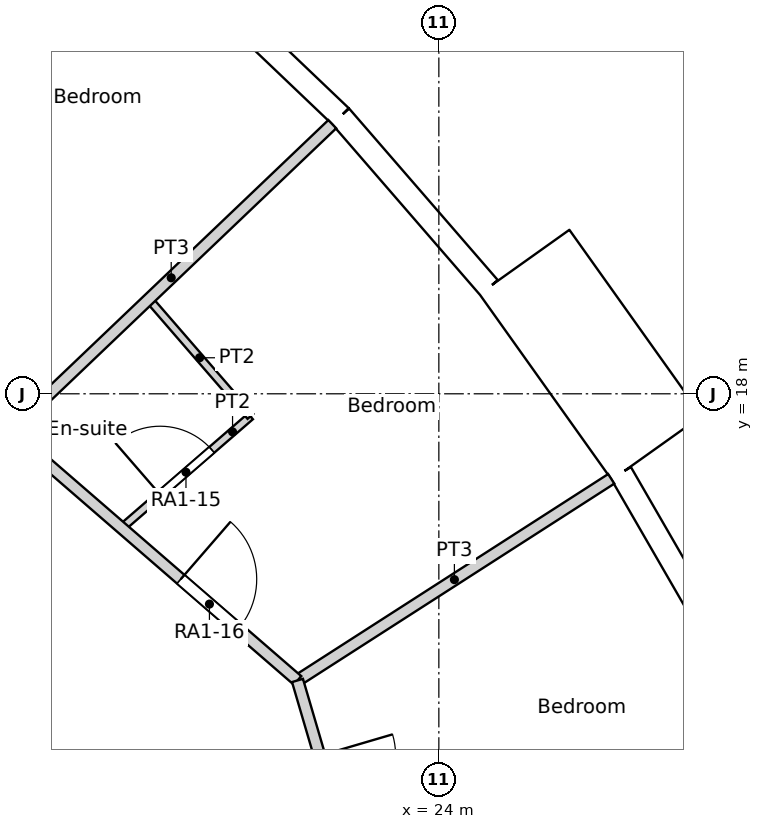
"""IFC4 building model, lengths in metres.
Left out: names, types, materials, properties, quantities, classifications, styles, units other than length and angle.
Written with IfcOpenShell. Run it as: python <this file> out.ifc"""

import sys

from ifc_helpers import new_model, si_unit, direction, frame, frame_2d, origin, origin_2d, place, context, subcontext, project, spatial, rectangle, circle, extrude, element, fill, save


model = new_model("IFC4")
c1 = context("Model", 3, precision=1e-05, world=origin(), true_north=direction((0.0, 1.0)))
c2 = subcontext(c1, "Body", "Model", "MODEL_VIEW")
j1 = project(units=[si_unit("LENGTHUNIT", "METRE"), si_unit("PLANEANGLEUNIT", "RADIAN")], contexts=[c1])
p1 = place(None, origin())
s1 = spatial("IfcSite", under=j1, at=p1, CompositionType="ELEMENT")
p2 = place(p1, origin())
s2 = spatial("IfcBuilding", under=s1, at=p2, CompositionType="ELEMENT")
p3 = place(p2, frame((0.0, 0.0, 28.2)))
s3 = spatial("IfcBuildingStorey", under=s2, at=p3, CompositionType="ELEMENT", Elevation=28.2)
for number, where, z_axis, x_axis in (
    (1, (25.469, 16.368, 0.0), (0.0, 0.0, 1.0), (1.0, 0.0, 0.0)),
    (2, (21.911, 20.892, 0.0), (0.0, 0.0, 1.0), (1.0, 0.0, 0.0)),
):
    element("IfcColumn", number, at=place(p3, frame(where, z_axis=z_axis, x_axis=x_axis)), inside=s3, PredefinedType="COLUMN", context=c2, shape_type="SweptSolid", body=[
        extrude(circle(Radius=0.7, at=origin_2d()), origin(), (0.0, 0.0, 1.0), 3.6),
    ])
p4 = place(p3, frame((18.805, 15.779, 0.0), z_axis=(0.0, 0.0, 1.0), x_axis=(1.0, 0.0, 0.0)))
e3 = element("IfcColumn", 3, at=p4, inside=s3, PredefinedType="COLUMN", context=c2, shape_type="SweptSolid", body=[
    extrude(circle(Radius=0.75, at=origin_2d()), origin(), (0.0, 0.0, 1.0), 3.6),
])
p5 = place(p3, frame((27.887, 14.377, 0.0), z_axis=(0.0, 0.0, 1.0), x_axis=(-0.499999078476, 0.866025935826, 0.0)))
e4 = element("IfcWall", 4, at=p5, inside=s3, PredefinedType="SOLIDWALL", context=c2, shape_type="SweptSolid", body=[
    extrude(rectangle(XDim=2.979, YDim=0.3, at=frame_2d((1.49, 0.0))), origin(), (0.0, 0.0, 1.0), 3.15),
])
p6 = place(p5, frame((1.49, 0.0, 1.55)))
e5 = element("IfcOpeningElement", 5, at=p6, cuts=e4, PredefinedType="OPENING", context=c2, shape_type="SweptSolid", body=[
    extrude(circle(Radius=0.9, at=origin_2d()), frame((0.0, 0.16, 0.0), z_axis=(0.0, -1.0, 0.0), x_axis=(1.0, 0.0, 0.0)), (0.0, 0.0, 1.0), 0.32),
])
p7 = place(p3, frame((26.866, 17.29, -0.45), z_axis=(0.0, 0.0, 1.0), x_axis=(-0.580090570606, 0.814551981088, 0.0)))
e6 = element("IfcWall", 6, at=p7, inside=s3, PredefinedType="ELEMENTEDWALL", context=c2, shape_type="SweptSolid", body=[
    extrude(rectangle(XDim=3.0, YDim=1.45, at=frame_2d((1.5, 0.0))), origin(), (0.0, 0.0, 1.0), 3.6),
])
p8 = place(p7, frame((1.5, 0.0, 2.0)))
e7 = element("IfcOpeningElement", 7, at=p8, cuts=e6, PredefinedType="OPENING", context=c2, shape_type="SweptSolid", body=[
    extrude(circle(Radius=0.9, at=origin_2d()), frame((0.0, 0.735, 0.0), z_axis=(0.0, -1.0, 0.0), x_axis=(1.0, 0.0, 0.0)), (0.0, 0.0, 1.0), 1.47),
])
p9 = place(p3, frame((24.658, 19.399, 0.0), z_axis=(0.0, 0.0, 1.0), x_axis=(-0.654830712471, 0.755775587066, 0.0)))
e8 = element("IfcWall", 8, at=p9, inside=s3, PredefinedType="SOLIDWALL", context=c2, shape_type="SweptSolid", body=[
    extrude(rectangle(XDim=2.98, YDim=0.3, at=frame_2d((1.49, 0.0))), origin(), (0.0, 0.0, 1.0), 3.15),
])
p10 = place(p9, frame((1.49, 0.0, 1.55)))
e9 = element("IfcOpeningElement", 9, at=p10, cuts=e8, PredefinedType="OPENING", context=c2, shape_type="SweptSolid", body=[
    extrude(circle(Radius=0.9, at=origin_2d()), frame((0.0, 0.16, 0.0), z_axis=(0.0, -1.0, 0.0), x_axis=(1.0, 0.0, 0.0)), (0.0, 0.0, 1.0), 0.32),
])
p11 = place(p3, frame((22.707, 21.651, 0.0), z_axis=(0.0, 0.0, 1.0), x_axis=(-0.723744206617, 0.690068346896, 0.0)))
e10 = element("IfcWall", 10, at=p11, inside=s3, PredefinedType="SOLIDWALL", context=c2, shape_type="SweptSolid", body=[
    extrude(rectangle(XDim=2.98, YDim=0.3, at=frame_2d((1.49, 0.0))), origin(), (0.0, 0.0, 1.0), 3.15),
])
p12 = place(p11, frame((1.49, 0.0, 1.55)))
e11 = element("IfcOpeningElement", 11, at=p12, cuts=e10, PredefinedType="OPENING", context=c2, shape_type="SweptSolid", body=[
    extrude(circle(Radius=0.9, at=origin_2d()), frame((0.0, 0.16, 0.0), z_axis=(0.0, -1.0, 0.0), x_axis=(1.0, 0.0, 0.0)), (0.0, 0.0, 1.0), 0.32),
])
p13 = place(p3, frame((22.14, 14.229, 0.0), z_axis=(0.0, 0.0, 1.0), x_axis=(0.281780364869, -0.959478934617, 0.0)))
e12 = element("IfcWall", 12, at=p13, inside=s3, PredefinedType="PARTITIONING", context=c2, shape_type="SweptSolid", body=[
    extrude(rectangle(XDim=14.83, YDim=0.15, at=frame_2d((7.415, 0.0))), origin(), (0.0, 0.0, 1.0), 3.15),
])
p14 = place(p13, frame((10.816, 0.0, 0.0)))
e13 = element("IfcOpeningElement", 13, at=p14, cuts=e12, PredefinedType="OPENING", context=c2, shape_type="SweptSolid", body=[
    extrude(rectangle(XDim=1.0, YDim=2.1, at=frame_2d((0.5, 1.05))), frame((0.0, 0.075, 0.0), z_axis=(0.0, -1.0, 0.0), x_axis=(1.0, 0.0, 0.0)), (0.0, 0.0, 1.0), 0.15),
])
p15 = place(p13, frame((5.953, 0.0, 0.0)))
e14 = element("IfcOpeningElement", 14, at=p15, cuts=e12, PredefinedType="OPENING", context=c2, shape_type="SweptSolid", body=[
    extrude(rectangle(XDim=1.0, YDim=2.1, at=frame_2d((0.5, 1.05))), frame((0.0, 0.075, 0.0), z_axis=(0.0, -1.0, 0.0), x_axis=(1.0, 0.0, 0.0)), (0.0, 0.0, 1.0), 0.15),
])
p16 = place(p13, frame((1.033, 0.0, 0.0)))
e15 = element("IfcOpeningElement", 15, at=p16, cuts=e12, PredefinedType="OPENING", context=c2, shape_type="SweptSolid", body=[
    extrude(rectangle(XDim=1.0, YDim=2.1, at=frame_2d((0.5, 1.05))), frame((0.0, 0.075, 0.0), z_axis=(0.0, -1.0, 0.0), x_axis=(1.0, 0.0, 0.0)), (0.0, 0.0, 1.0), 0.15),
])
p17 = place(p3, frame((10.932, 23.939, 0.0), z_axis=(0.0, 0.0, 1.0), x_axis=(0.755838982892, -0.654757536757, 0.0)))
e16 = element("IfcWall", 16, at=p17, inside=s3, PredefinedType="PARTITIONING", context=c2, shape_type="SweptSolid", body=[
    extrude(rectangle(XDim=14.83, YDim=0.15, at=frame_2d((7.415, 0.0))), origin(), (0.0, 0.0, 1.0), 3.15),
])
p18 = place(p17, frame((12.796, 0.0, 0.0)))
e17 = element("IfcOpeningElement", 17, at=p18, cuts=e16, PredefinedType="OPENING", context=c2, shape_type="SweptSolid", body=[
    extrude(rectangle(XDim=1.0, YDim=2.1, at=frame_2d((0.5, 1.05))), frame((0.0, 0.075, 0.0), z_axis=(0.0, -1.0, 0.0), x_axis=(1.0, 0.0, 0.0)), (0.0, 0.0, 1.0), 0.15),
])
p19 = place(p17, frame((7.572, 0.0, 0.0)))
e18 = element("IfcOpeningElement", 18, at=p19, cuts=e16, PredefinedType="OPENING", context=c2, shape_type="SweptSolid", body=[
    extrude(rectangle(XDim=1.0, YDim=2.1, at=frame_2d((0.5, 1.05))), frame((0.0, 0.075, 0.0), z_axis=(0.0, -1.0, 0.0), x_axis=(1.0, 0.0, 0.0)), (0.0, 0.0, 1.0), 0.15),
])
p20 = place(p17, frame((1.033, 0.0, 0.0)))
e19 = element("IfcOpeningElement", 19, at=p20, cuts=e16, PredefinedType="OPENING", context=c2, shape_type="SweptSolid", body=[
    extrude(rectangle(XDim=1.0, YDim=2.1, at=frame_2d((0.5, 1.05))), frame((0.0, 0.075, 0.0), z_axis=(0.0, -1.0, 0.0), x_axis=(1.0, 0.0, 0.0)), (0.0, 0.0, 1.0), 0.15),
])
p21 = place(p3, frame((22.141, 14.229, 0.0), z_axis=(0.0, 0.0, 1.0), x_axis=(0.841265781699, 0.540621757371, 0.0)))
e20 = element("IfcWall", 20, at=p21, inside=s3, PredefinedType="PARTITIONING", context=c2, shape_type="SweptSolid", body=[
    extrude(rectangle(XDim=4.906, YDim=0.15, at=frame_2d((2.453, 0.0))), origin(), (0.0, 0.0, 1.0), 3.15),
])
p22 = place(p3, frame((19.826, 16.234, 0.0), z_axis=(0.0, 0.0, 1.0), x_axis=(0.755703447798, 0.654913963042, 0.0)))
e21 = element("IfcWall", 21, at=p22, inside=s3, PredefinedType="PARTITIONING", context=c2, shape_type="SweptSolid", body=[
    extrude(rectangle(XDim=2.243, YDim=0.1, at=frame_2d((1.122, 0.0))), origin(), (0.0, 0.0, 1.0), 3.15),
])
p23 = place(p22, frame((0.671, 0.0, 0.0)))
e22 = element("IfcOpeningElement", 22, at=p23, cuts=e21, PredefinedType="OPENING", context=c2, shape_type="SweptSolid", body=[
    extrude(rectangle(XDim=0.9, YDim=2.04, at=frame_2d((0.45, 1.02))), frame((0.0, 0.05, 0.0), z_axis=(0.0, -1.0, 0.0), x_axis=(1.0, 0.0, 0.0)), (0.0, 0.0, 1.0), 0.1),
])
p24 = place(p3, frame((20.184, 19.245, 0.0), z_axis=(0.0, 0.0, 1.0), x_axis=(0.655017058368, -0.755614090159, 0.0)))
e23 = element("IfcWall", 23, at=p24, inside=s3, PredefinedType="PARTITIONING", context=c2, shape_type="SweptSolid", body=[
    extrude(rectangle(XDim=2.041, YDim=0.1, at=frame_2d((1.021, 0.0))), origin(), (0.0, 0.0, 1.0), 3.15),
])
p25 = place(p3, frame((18.36, 17.505, 0.0), z_axis=(0.0, 0.0, 1.0), x_axis=(0.723686703731, 0.690128650937, 0.0)))
e24 = element("IfcWall", 24, at=p25, inside=s3, PredefinedType="PARTITIONING", context=c2, shape_type="SweptSolid", body=[
    extrude(rectangle(XDim=5.856, YDim=0.15, at=frame_2d((2.928, 0.0))), origin(), (0.0, 0.0, 1.0), 3.15),
])
p26 = place(p6, origin())
e25 = element("IfcWindow", 25, at=p26, inside=s3, PartitioningType="SINGLE_PANEL", PredefinedType="WINDOW", context=c2, shape_type="SweptSolid", body=[
    extrude(circle(Radius=0.9, at=origin_2d()), frame((0.0, 0.12, 0.0), z_axis=(0.0, -1.0, 0.0), x_axis=(1.0, 0.0, 0.0)), (0.0, 0.0, 1.0), 0.1),
])
fill(e5, e25)
p27 = place(p8, origin())
e26 = element("IfcWindow", 26, at=p27, inside=s3, PartitioningType="SINGLE_PANEL", PredefinedType="WINDOW", context=c2, shape_type="SweptSolid", body=[
    extrude(circle(Radius=0.9, at=origin_2d()), frame((0.0, 0.695, 0.0), z_axis=(0.0, -1.0, 0.0), x_axis=(1.0, 0.0, 0.0)), (0.0, 0.0, 1.0), 0.1),
])
fill(e7, e26)
p28 = place(p10, origin())
e27 = element("IfcWindow", 27, at=p28, inside=s3, PartitioningType="SINGLE_PANEL", PredefinedType="WINDOW", context=c2, shape_type="SweptSolid", body=[
    extrude(circle(Radius=0.9, at=origin_2d()), frame((0.0, 0.12, 0.0), z_axis=(0.0, -1.0, 0.0), x_axis=(1.0, 0.0, 0.0)), (0.0, 0.0, 1.0), 0.1),
])
fill(e9, e27)
p29 = place(p12, origin())
e28 = element("IfcWindow", 28, at=p29, inside=s3, PartitioningType="SINGLE_PANEL", PredefinedType="WINDOW", context=c2, shape_type="SweptSolid", body=[
    extrude(circle(Radius=0.9, at=origin_2d()), frame((0.0, 0.12, 0.0), z_axis=(0.0, -1.0, 0.0), x_axis=(1.0, 0.0, 0.0)), (0.0, 0.0, 1.0), 0.1),
])
fill(e11, e28)
p30 = place(p23, origin())
e29 = element("IfcDoor", 29, at=p30, inside=s3, OperationType="SINGLE_SWING_LEFT", PredefinedType="DOOR", context=c2, shape_type="SweptSolid", body=[
    extrude(rectangle(XDim=0.9, YDim=2.04, at=frame_2d((0.45, 1.02))), frame((0.0, 0.025, 0.0), z_axis=(0.0, -1.0, 0.0), x_axis=(1.0, 0.0, 0.0)), (0.0, 0.0, 1.0), 0.05),
])
fill(e22, e29)
p31 = place(p18, origin())
e30 = element("IfcDoor", 30, at=p31, inside=s3, OperationType="SINGLE_SWING_LEFT", PredefinedType="DOOR", context=c2, shape_type="SweptSolid", body=[
    extrude(rectangle(XDim=1.0, YDim=2.1, at=frame_2d((0.5, 1.05))), frame((0.0, 0.025, 0.0), z_axis=(0.0, -1.0, 0.0), x_axis=(1.0, 0.0, 0.0)), (0.0, 0.0, 1.0), 0.05),
])
fill(e17, e30)
save(model, sys.argv[1])
